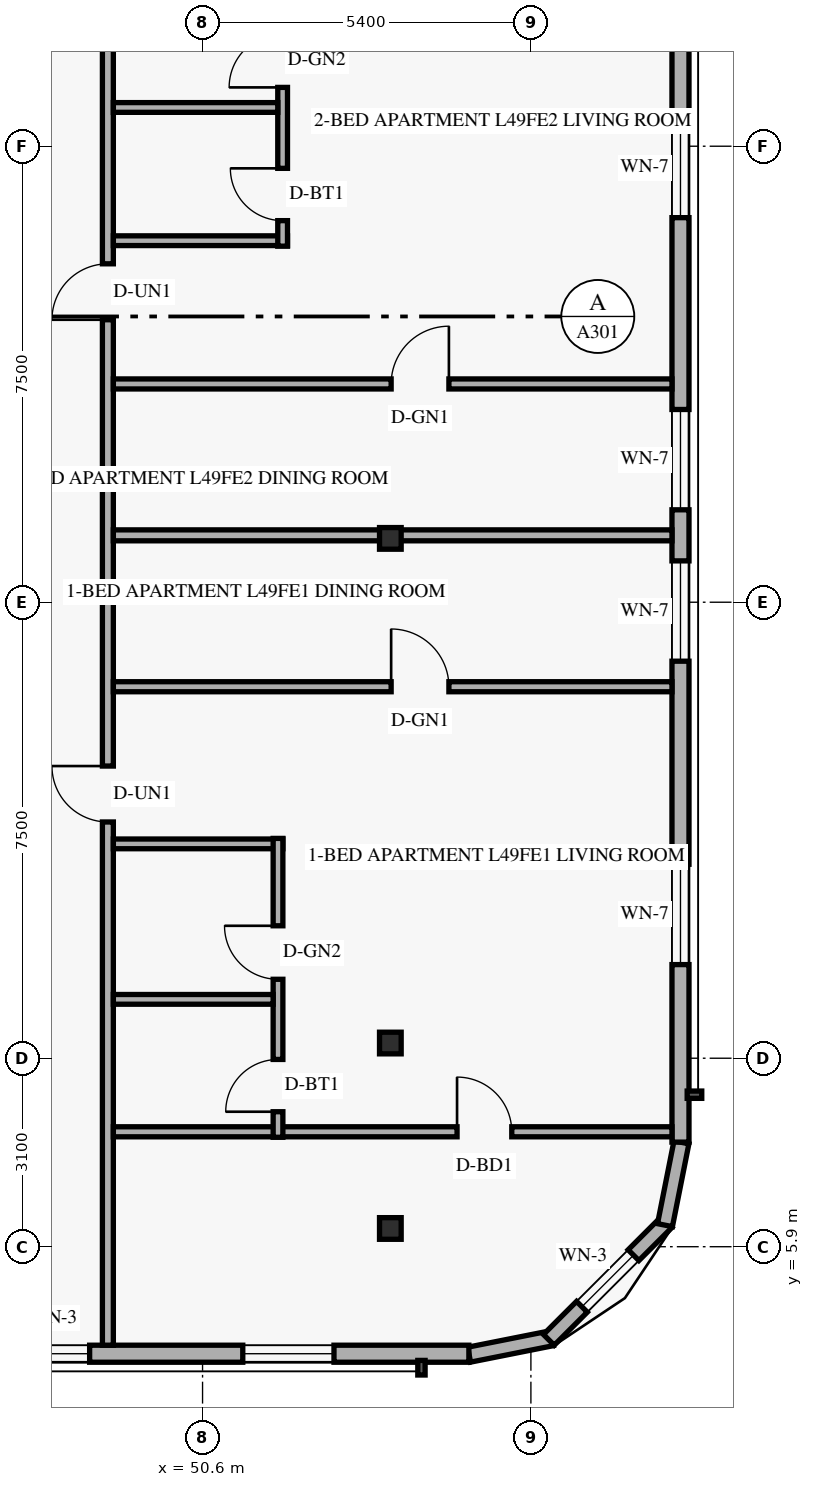
"""IFC4 building model, lengths in metres.
Left out: names, types, materials, properties, quantities, classifications, styles, units other than length and angle.
Written with IfcOpenShell. Run it as: python <this file> out.ifc"""

import sys

from ifc_helpers import new_model, si_unit, direction, frame, frame_2d, origin, origin_2d, place, context, subcontext, project, spatial, rectangle, hollow_rectangle, extrude, element, fill, save


model = new_model("IFC4")
c1 = context("Model", 3, precision=1e-05, world=origin(), true_north=direction((0.0, 1.0)))
c2 = subcontext(c1, "Body", "Model", "MODEL_VIEW")
j1 = project(units=[si_unit("LENGTHUNIT", "METRE"), si_unit("PLANEANGLEUNIT", "RADIAN")], contexts=[c1])
p1 = place(None, origin())
s1 = spatial("IfcSite", under=j1, at=p1, CompositionType="ELEMENT")
p2 = place(p1, origin())
s2 = spatial("IfcBuilding", under=s1, at=p2, CompositionType="ELEMENT")
p3 = place(p2, frame((0.0, 0.0, 188.4)))
s3 = spatial("IfcBuildingStorey", under=s2, at=p3, CompositionType="ELEMENT", Elevation=188.4)
for number, where, z_axis, x_axis in (
    (1, (53.584, 6.2, 0.0), (0.058, 0.0, 0.998), (0.0, 1.0, 0.0)),
    (2, (53.584, 9.25, 0.0), (0.058, 0.0, 0.998), (0.0, 1.0, 0.0)),
    (3, (53.584, 17.55, 0.0), (0.058, 0.0, 0.998), (0.0, 1.0, 0.0)),
):
    element("IfcColumn", number, at=place(p3, frame(where, z_axis=z_axis, x_axis=x_axis)), inside=s3, PredefinedType="COLUMN", context=c2, shape_type="SweptSolid", body=[
        extrude(hollow_rectangle(XDim=0.356, YDim=0.356, WallThickness=0.016, at=origin_2d()), origin(), (0.0, 0.0, 1.0), 3.606),
    ])
p4 = place(p3, frame((54.983, 4.124, 0.0), z_axis=(0.0, 0.0, 1.0), x_axis=(0.980809899341, 0.19496651342, 0.0)))
e4 = element("IfcWall", 4, at=p4, inside=s3, PredefinedType="SOLIDWALL", context=c2, shape_type="SweptSolid", body=[
    extrude(rectangle(XDim=1.389, YDim=0.25, at=frame_2d((0.694, 0.0))), origin(), (0.0, 0.0, 1.0), 3.35),
])
p5 = place(p3, frame((56.295, 4.368, 0.0), z_axis=(0.0, 0.0, 1.0), x_axis=(0.707106781187, 0.707106781187, 0.0)))
e5 = element("IfcWall", 5, at=p5, inside=s3, PredefinedType="SOLIDWALL", context=c2, shape_type="SweptSolid", body=[
    extrude(rectangle(XDim=2.739, YDim=0.25, at=frame_2d((1.37, 0.0))), origin(), (0.0, 0.0, 1.0), 3.35),
])
p6 = place(p5, frame((0.77, 0.0, 0.85)))
e6 = element("IfcOpeningElement", 6, at=p6, cuts=e5, PredefinedType="OPENING", context=c2, shape_type="SweptSolid", body=[
    extrude(rectangle(XDim=1.2, YDim=1.5, at=frame_2d((0.6, 0.75))), frame((0.0, 0.135, 0.0), z_axis=(0.0, -1.0, 0.0), x_axis=(1.0, 0.0, 0.0)), (0.0, 0.0, 1.0), 0.27),
])
p7 = place(p3, frame((58.205, 6.254, 0.0), z_axis=(0.0, 0.0, 1.0), x_axis=(0.19496651342, 0.980809899341, 0.0)))
e7 = element("IfcWall", 7, at=p7, inside=s3, PredefinedType="SOLIDWALL", context=c2, shape_type="SweptSolid", body=[
    extrude(rectangle(XDim=1.389, YDim=0.25, at=frame_2d((0.694, 0.0))), origin(), (0.0, 0.0, 1.0), 3.35),
])
p8 = place(p3, frame((34.4, 4.14, 0.0), z_axis=(0.0, 0.0, 1.0), x_axis=(1.0, 0.0, 0.0)))
e8 = element("IfcWall", 8, at=p8, inside=s3, PredefinedType="SOLIDWALL", context=c2, shape_type="SweptSolid", body=[
    extrude(rectangle(XDim=20.58, YDim=0.28, at=frame_2d((10.29, 0.0))), origin(), (0.0, 0.0, 1.0), 3.35),
])
p9 = place(p8, frame((1.535, 0.0, 0.85)))
e9 = element("IfcOpeningElement", 9, at=p9, cuts=e8, PredefinedType="OPENING", context=c2, shape_type="SweptSolid", body=[
    extrude(rectangle(XDim=1.5, YDim=1.55, at=frame_2d((0.75, 0.775))), frame((0.0, 0.15, 0.0), z_axis=(0.0, -1.0, 0.0), x_axis=(1.0, 0.0, 0.0)), (0.0, 0.0, 1.0), 0.3),
])
p10 = place(p8, frame((5.876, 0.0, 0.85)))
e10 = element("IfcOpeningElement", 10, at=p10, cuts=e8, PredefinedType="OPENING", context=c2, shape_type="SweptSolid", body=[
    extrude(rectangle(XDim=1.5, YDim=1.55, at=frame_2d((0.75, 0.775))), frame((0.0, 0.15, 0.0), z_axis=(0.0, -1.0, 0.0), x_axis=(1.0, 0.0, 0.0)), (0.0, 0.0, 1.0), 0.3),
])
p11 = place(p8, frame((10.523, 0.0, 0.85)))
e11 = element("IfcOpeningElement", 11, at=p11, cuts=e8, PredefinedType="OPENING", context=c2, shape_type="SweptSolid", body=[
    extrude(rectangle(XDim=1.5, YDim=1.55, at=frame_2d((0.75, 0.775))), frame((0.0, 0.15, 0.0), z_axis=(0.0, -1.0, 0.0), x_axis=(1.0, 0.0, 0.0)), (0.0, 0.0, 1.0), 0.3),
])
p12 = place(p8, frame((13.143, 0.0, 0.85)))
e12 = element("IfcOpeningElement", 12, at=p12, cuts=e8, PredefinedType="OPENING", context=c2, shape_type="SweptSolid", body=[
    extrude(rectangle(XDim=1.2, YDim=1.5, at=frame_2d((0.6, 0.75))), frame((0.0, 0.15, 0.0), z_axis=(0.0, -1.0, 0.0), x_axis=(1.0, 0.0, 0.0)), (0.0, 0.0, 1.0), 0.3),
])
p13 = place(p8, frame((16.862, 0.0, 0.85)))
e13 = element("IfcOpeningElement", 13, at=p13, cuts=e8, PredefinedType="OPENING", context=c2, shape_type="SweptSolid", body=[
    extrude(rectangle(XDim=1.5, YDim=1.55, at=frame_2d((0.75, 0.775))), frame((0.0, 0.15, 0.0), z_axis=(0.0, -1.0, 0.0), x_axis=(1.0, 0.0, 0.0)), (0.0, 0.0, 1.0), 0.3),
])
p14 = place(p3, frame((58.46, 7.62, 0.0), z_axis=(0.0, 0.0, 1.0), x_axis=(0.0, 1.0, 0.0)))
e14 = element("IfcWall", 14, at=p14, inside=s3, PredefinedType="SOLIDWALL", context=c2, shape_type="SweptSolid", body=[
    extrude(rectangle(XDim=32.76, YDim=0.28, at=frame_2d((16.38, 0.0))), origin(), (0.0, 0.0, 1.0), 3.35),
])
p15 = place(p14, frame((2.92, 0.0, 0.85)))
e15 = element("IfcOpeningElement", 15, at=p15, cuts=e14, PredefinedType="OPENING", context=c2, shape_type="SweptSolid", body=[
    extrude(rectangle(XDim=1.65, YDim=1.6, at=frame_2d((0.825, 0.8))), frame((0.0, 0.15, 0.0), z_axis=(0.0, -1.0, 0.0), x_axis=(1.0, 0.0, 0.0)), (0.0, 0.0, 1.0), 0.3),
])
p16 = place(p14, frame((7.91, 0.0, 0.85)))
e16 = element("IfcOpeningElement", 16, at=p16, cuts=e14, PredefinedType="OPENING", context=c2, shape_type="SweptSolid", body=[
    extrude(rectangle(XDim=1.65, YDim=1.6, at=frame_2d((0.825, 0.8))), frame((0.0, 0.15, 0.0), z_axis=(0.0, -1.0, 0.0), x_axis=(1.0, 0.0, 0.0)), (0.0, 0.0, 1.0), 0.3),
])
p17 = place(p14, frame((10.4, 0.0, 0.85)))
e17 = element("IfcOpeningElement", 17, at=p17, cuts=e14, PredefinedType="OPENING", context=c2, shape_type="SweptSolid", body=[
    extrude(rectangle(XDim=1.65, YDim=1.6, at=frame_2d((0.825, 0.8))), frame((0.0, 0.15, 0.0), z_axis=(0.0, -1.0, 0.0), x_axis=(1.0, 0.0, 0.0)), (0.0, 0.0, 1.0), 0.3),
])
p18 = place(p14, frame((15.205, 0.0, 0.85)))
e18 = element("IfcOpeningElement", 18, at=p18, cuts=e14, PredefinedType="OPENING", context=c2, shape_type="SweptSolid", body=[
    extrude(rectangle(XDim=1.65, YDim=1.6, at=frame_2d((0.825, 0.8))), frame((0.0, 0.15, 0.0), z_axis=(0.0, -1.0, 0.0), x_axis=(1.0, 0.0, 0.0)), (0.0, 0.0, 1.0), 0.3),
])
p19 = place(p14, frame((20.76, 0.0, 0.85)))
e19 = element("IfcOpeningElement", 19, at=p19, cuts=e14, PredefinedType="OPENING", context=c2, shape_type="SweptSolid", body=[
    extrude(rectangle(XDim=1.65, YDim=1.6, at=frame_2d((0.825, 0.8))), frame((0.0, 0.15, 0.0), z_axis=(0.0, -1.0, 0.0), x_axis=(1.0, 0.0, 0.0)), (0.0, 0.0, 1.0), 0.3),
])
p20 = place(p14, frame((24.0, 0.0, 0.85)))
e20 = element("IfcOpeningElement", 20, at=p20, cuts=e14, PredefinedType="OPENING", context=c2, shape_type="SweptSolid", body=[
    extrude(rectangle(XDim=1.65, YDim=1.6, at=frame_2d((0.825, 0.8))), frame((0.0, 0.15, 0.0), z_axis=(0.0, -1.0, 0.0), x_axis=(1.0, 0.0, 0.0)), (0.0, 0.0, 1.0), 0.3),
])
p21 = place(p14, frame((28.59, 0.0, 0.85)))
e21 = element("IfcOpeningElement", 21, at=p21, cuts=e14, PredefinedType="OPENING", context=c2, shape_type="SweptSolid", body=[
    extrude(rectangle(XDim=1.65, YDim=1.6, at=frame_2d((0.825, 0.8))), frame((0.0, 0.15, 0.0), z_axis=(0.0, -1.0, 0.0), x_axis=(1.0, 0.0, 0.0)), (0.0, 0.0, 1.0), 0.3),
])
p22 = place(p3, frame((49.043, 4.28, 0.0), z_axis=(0.0, 0.0, 1.0), x_axis=(0.0, 1.0, 0.0)))
e22 = element("IfcWall", 22, at=p22, inside=s3, PredefinedType="STANDARD", context=c2, shape_type="SweptSolid", body=[
    extrude(rectangle(XDim=39.44, YDim=0.18, at=frame_2d((19.72, 0.0))), origin(), (0.0, 0.0, 1.0), 2.72),
])
p23 = place(p22, frame((8.605, 0.0, 0.0)))
e23 = element("IfcOpeningElement", 23, at=p23, cuts=e22, PredefinedType="OPENING", context=c2, shape_type="SweptSolid", body=[
    extrude(rectangle(XDim=0.92, YDim=2.15, at=frame_2d((0.46, 1.075))), frame((0.0, 0.1, 0.0), z_axis=(0.0, -1.0, 0.0), x_axis=(1.0, 0.0, 0.0)), (0.0, 0.0, 1.0), 0.2),
])
p24 = place(p22, frame((16.866, 0.0, 0.0)))
e24 = element("IfcOpeningElement", 24, at=p24, cuts=e22, PredefinedType="OPENING", context=c2, shape_type="SweptSolid", body=[
    extrude(rectangle(XDim=0.92, YDim=2.15, at=frame_2d((0.46, 1.075))), frame((0.0, 0.1, 0.0), z_axis=(0.0, -1.0, 0.0), x_axis=(1.0, 0.0, 0.0)), (0.0, 0.0, 1.0), 0.2),
])
p25 = place(p22, frame((29.98, 0.0, 0.0)))
e25 = element("IfcOpeningElement", 25, at=p25, cuts=e22, PredefinedType="OPENING", context=c2, shape_type="SweptSolid", body=[
    extrude(rectangle(XDim=0.92, YDim=2.15, at=frame_2d((0.46, 1.075))), frame((0.0, 0.1, 0.0), z_axis=(0.0, -1.0, 0.0), x_axis=(1.0, 0.0, 0.0)), (0.0, 0.0, 1.0), 0.2),
])
p26 = place(p3, frame((49.133, 7.79, 0.0), z_axis=(0.0, 0.0, 1.0), x_axis=(1.0, 0.0, 0.0)))
e26 = element("IfcWall", 26, at=p26, inside=s3, PredefinedType="PARTITIONING", context=c2, shape_type="SweptSolid", body=[
    extrude(rectangle(XDim=9.187, YDim=0.165, at=frame_2d((4.594, 0.0))), origin(), (0.0, 0.0, 1.0), 2.869),
])
p27 = place(p26, frame((5.653, 0.0, 0.0)))
e27 = element("IfcOpeningElement", 27, at=p27, cuts=e26, PredefinedType="OPENING", context=c2, shape_type="SweptSolid", body=[
    extrude(rectangle(XDim=0.9, YDim=2.14, at=frame_2d((0.45, 1.07))), frame((0.0, 0.093, 0.0), z_axis=(0.0, -1.0, 0.0), x_axis=(1.0, 0.0, 0.0)), (0.0, 0.0, 1.0), 0.185),
])
p28 = place(p3, frame((49.133, 12.525, 0.0), z_axis=(0.0, 0.0, 1.0), x_axis=(1.0, 0.0, 0.0)))
e28 = element("IfcWall", 28, at=p28, inside=s3, PredefinedType="PLUMBINGWALL", context=c2, shape_type="SweptSolid", body=[
    extrude(rectangle(XDim=2.788, YDim=0.16, at=frame_2d((1.394, 0.0))), origin(), (0.0, 0.0, 1.0), 3.35),
])
p29 = place(p3, frame((51.841, 7.7, 0.0), z_axis=(0.0, 0.0, 1.0), x_axis=(0.0, 1.0, 0.0)))
e29 = element("IfcWall", 29, at=p29, inside=s3, PredefinedType="PLUMBINGWALL", context=c2, shape_type="SweptSolid", body=[
    extrude(rectangle(XDim=4.916, YDim=0.16, at=frame_2d((2.458, 0.0))), origin(), (0.0, 0.0, 1.0), 2.72),
])
p30 = place(p29, frame((0.42, 0.0, 0.0)))
e30 = element("IfcOpeningElement", 30, at=p30, cuts=e29, PredefinedType="OPENING", context=c2, shape_type="SweptSolid", body=[
    extrude(rectangle(XDim=0.86, YDim=2.12, at=frame_2d((0.43, 1.06))), frame((0.0, 0.09, 0.0), z_axis=(0.0, -1.0, 0.0), x_axis=(1.0, 0.0, 0.0)), (0.0, 0.0, 1.0), 0.18),
])
p31 = place(p29, frame((2.598, 0.0, 0.0)))
e31 = element("IfcOpeningElement", 31, at=p31, cuts=e29, PredefinedType="OPENING", context=c2, shape_type="SweptSolid", body=[
    extrude(rectangle(XDim=0.88, YDim=2.12, at=frame_2d((0.44, 1.06))), frame((0.0, 0.09, 0.0), z_axis=(0.0, -1.0, 0.0), x_axis=(1.0, 0.0, 0.0)), (0.0, 0.0, 1.0), 0.18),
])
p32 = place(p3, frame((49.133, 9.968, 0.0), z_axis=(0.0, 0.0, 1.0), x_axis=(1.0, 0.0, 0.0)))
e32 = element("IfcWall", 32, at=p32, inside=s3, PredefinedType="PLUMBINGWALL", context=c2, shape_type="SweptSolid", body=[
    extrude(rectangle(XDim=2.628, YDim=0.16, at=frame_2d((1.314, 0.0))), origin(), (0.0, 0.0, 1.0), 3.35),
])
p33 = place(p3, frame((49.133, 15.11, 0.0), z_axis=(0.0, 0.0, 1.0), x_axis=(1.0, 0.0, 0.0)))
e33 = element("IfcWall", 33, at=p33, inside=s3, PredefinedType="PARTITIONING", context=c2, shape_type="SweptSolid", body=[
    extrude(rectangle(XDim=9.187, YDim=0.165, at=frame_2d((4.594, 0.0))), origin(), (0.0, 0.0, 1.0), 2.869),
])
p34 = place(p33, frame((4.569, 0.0, 0.0)))
e34 = element("IfcOpeningElement", 34, at=p34, cuts=e33, PredefinedType="OPENING", context=c2, shape_type="SweptSolid", body=[
    extrude(rectangle(XDim=0.95, YDim=2.15, at=frame_2d((0.475, 1.075))), frame((0.0, 0.093, 0.0), z_axis=(0.0, -1.0, 0.0), x_axis=(1.0, 0.0, 0.0)), (0.0, 0.0, 1.0), 0.185),
])
p35 = place(p3, frame((49.133, 17.6, 0.0), z_axis=(0.0, 0.0, 1.0), x_axis=(1.0, 0.0, 0.0)))
e35 = element("IfcWall", 35, at=p35, inside=s3, PredefinedType="PARTITIONING", context=c2, shape_type="SweptSolid", body=[
    extrude(rectangle(XDim=9.187, YDim=0.18, at=frame_2d((4.594, 0.0))), origin(), (0.0, 0.0, 1.0), 2.72),
])
p36 = place(p3, frame((49.133, 22.446, 0.0), z_axis=(0.0, 0.0, 1.0), x_axis=(1.0, 0.0, 0.0)))
e36 = element("IfcWall", 36, at=p36, inside=s3, PredefinedType="PLUMBINGWALL", context=c2, shape_type="SweptSolid", body=[
    extrude(rectangle(XDim=2.864, YDim=0.16, at=frame_2d((1.432, 0.0))), origin(), (0.0, 0.0, 1.0), 3.35),
])
p37 = place(p3, frame((51.917, 22.356, 0.0), z_axis=(0.0, 0.0, 1.0), x_axis=(0.0, 1.0, 0.0)))
e37 = element("IfcWall", 37, at=p37, inside=s3, PredefinedType="PLUMBINGWALL", context=c2, shape_type="SweptSolid", body=[
    extrude(rectangle(XDim=4.944, YDim=0.16, at=frame_2d((2.472, 0.0))), origin(), (0.0, 0.0, 1.0), 3.35),
])
p38 = place(p37, frame((0.42, 0.0, 0.0)))
e38 = element("IfcOpeningElement", 38, at=p38, cuts=e37, PredefinedType="OPENING", context=c2, shape_type="SweptSolid", body=[
    extrude(rectangle(XDim=0.86, YDim=2.12, at=frame_2d((0.43, 1.06))), frame((0.0, 0.09, 0.0), z_axis=(0.0, -1.0, 0.0), x_axis=(1.0, 0.0, 0.0)), (0.0, 0.0, 1.0), 0.18),
])
p39 = place(p37, frame((2.611, 0.0, 0.0)))
e39 = element("IfcOpeningElement", 39, at=p39, cuts=e37, PredefinedType="OPENING", context=c2, shape_type="SweptSolid", body=[
    extrude(rectangle(XDim=0.88, YDim=2.12, at=frame_2d((0.44, 1.06))), frame((0.0, 0.09, 0.0), z_axis=(0.0, -1.0, 0.0), x_axis=(1.0, 0.0, 0.0)), (0.0, 0.0, 1.0), 0.18),
])
p40 = place(p3, frame((49.133, 24.637, 0.0), z_axis=(0.0, 0.0, 1.0), x_axis=(1.0, 0.0, 0.0)))
e40 = element("IfcWall", 40, at=p40, inside=s3, PredefinedType="PLUMBINGWALL", context=c2, shape_type="SweptSolid", body=[
    extrude(rectangle(XDim=2.704, YDim=0.16, at=frame_2d((1.352, 0.0))), origin(), (0.0, 0.0, 1.0), 3.35),
])
p41 = place(p3, frame((49.133, 20.09, 0.0), z_axis=(0.0, 0.0, 1.0), x_axis=(1.0, 0.0, 0.0)))
e41 = element("IfcWall", 41, at=p41, inside=s3, PredefinedType="PARTITIONING", context=c2, shape_type="SweptSolid", body=[
    extrude(rectangle(XDim=9.187, YDim=0.165, at=frame_2d((4.594, 0.0))), origin(), (0.0, 0.0, 1.0), 2.869),
])
p42 = place(p41, frame((4.569, 0.0, 0.0)))
e42 = element("IfcOpeningElement", 42, at=p42, cuts=e41, PredefinedType="OPENING", context=c2, shape_type="SweptSolid", body=[
    extrude(rectangle(XDim=0.95, YDim=2.15, at=frame_2d((0.475, 1.075))), frame((0.0, 0.093, 0.0), z_axis=(0.0, -1.0, 0.0), x_axis=(1.0, 0.0, 0.0)), (0.0, 0.0, 1.0), 0.185),
])
p43 = place(p6, origin())
e43 = element("IfcWindow", 43, at=p43, inside=s3, PartitioningType="SINGLE_PANEL", PredefinedType="WINDOW", context=c2, shape_type="SweptSolid", body=[
    extrude(rectangle(XDim=1.2, YDim=1.5, at=frame_2d((0.6, 0.75))), frame((0.0, 0.03, 0.0), z_axis=(0.0, -1.0, 0.0), x_axis=(1.0, 0.0, 0.0)), (0.0, 0.0, 1.0), 0.06),
])
fill(e6, e43)
p44 = place(p12, origin())
e44 = element("IfcWindow", 44, at=p44, inside=s3, PartitioningType="SINGLE_PANEL", PredefinedType="WINDOW", context=c2, shape_type="SweptSolid", body=[
    extrude(rectangle(XDim=1.2, YDim=1.5, at=frame_2d((0.6, 0.75))), frame((0.0, 0.03, 0.0), z_axis=(0.0, -1.0, 0.0), x_axis=(1.0, 0.0, 0.0)), (0.0, 0.0, 1.0), 0.06),
])
fill(e12, e44)
p45 = place(p13, origin())
e45 = element("IfcWindow", 45, at=p45, inside=s3, PartitioningType="SINGLE_PANEL", PredefinedType="WINDOW", context=c2, shape_type="SweptSolid", body=[
    extrude(rectangle(XDim=1.5, YDim=1.55, at=frame_2d((0.75, 0.775))), frame((0.0, 0.03, 0.0), z_axis=(0.0, -1.0, 0.0), x_axis=(1.0, 0.0, 0.0)), (0.0, 0.0, 1.0), 0.06),
])
fill(e13, e45)
p46 = place(p15, origin())
e46 = element("IfcWindow", 46, at=p46, inside=s3, PartitioningType="SINGLE_PANEL", PredefinedType="WINDOW", context=c2, shape_type="SweptSolid", body=[
    extrude(rectangle(XDim=1.65, YDim=1.6, at=frame_2d((0.825, 0.8))), frame((0.0, 0.03, 0.0), z_axis=(0.0, -1.0, 0.0), x_axis=(1.0, 0.0, 0.0)), (0.0, 0.0, 1.0), 0.06),
])
fill(e15, e46)
p47 = place(p16, origin())
e47 = element("IfcWindow", 47, at=p47, inside=s3, PartitioningType="SINGLE_PANEL", PredefinedType="WINDOW", context=c2, shape_type="SweptSolid", body=[
    extrude(rectangle(XDim=1.65, YDim=1.6, at=frame_2d((0.825, 0.8))), frame((0.0, 0.03, 0.0), z_axis=(0.0, -1.0, 0.0), x_axis=(1.0, 0.0, 0.0)), (0.0, 0.0, 1.0), 0.06),
])
fill(e16, e47)
p48 = place(p17, origin())
e48 = element("IfcWindow", 48, at=p48, inside=s3, PartitioningType="SINGLE_PANEL", PredefinedType="WINDOW", context=c2, shape_type="SweptSolid", body=[
    extrude(rectangle(XDim=1.65, YDim=1.6, at=frame_2d((0.825, 0.8))), frame((0.0, 0.03, 0.0), z_axis=(0.0, -1.0, 0.0), x_axis=(1.0, 0.0, 0.0)), (0.0, 0.0, 1.0), 0.06),
])
fill(e17, e48)
p49 = place(p18, origin())
e49 = element("IfcWindow", 49, at=p49, inside=s3, PartitioningType="SINGLE_PANEL", PredefinedType="WINDOW", context=c2, shape_type="SweptSolid", body=[
    extrude(rectangle(XDim=1.65, YDim=1.6, at=frame_2d((0.825, 0.8))), frame((0.0, 0.03, 0.0), z_axis=(0.0, -1.0, 0.0), x_axis=(1.0, 0.0, 0.0)), (0.0, 0.0, 1.0), 0.06),
])
fill(e18, e49)
p50 = place(p34, origin())
e50 = element("IfcDoor", 50, at=p50, inside=s3, OperationType="SINGLE_SWING_LEFT", PredefinedType="DOOR", context=c2, shape_type="SweptSolid", body=[
    extrude(rectangle(XDim=0.95, YDim=2.15, at=frame_2d((0.475, 1.075))), frame((0.0, 0.025, 0.0), z_axis=(0.0, -1.0, 0.0), x_axis=(1.0, 0.0, 0.0)), (0.0, 0.0, 1.0), 0.05),
])
fill(e34, e50)
p51 = place(p23, origin())
e51 = element("IfcDoor", 51, at=p51, inside=s3, OperationType="SINGLE_SWING_RIGHT", PredefinedType="DOOR", context=c2, shape_type="SweptSolid", body=[
    extrude(rectangle(XDim=0.92, YDim=2.15, at=frame_2d((0.46, 1.075))), frame((0.0, 0.025, 0.0), z_axis=(0.0, -1.0, 0.0), x_axis=(1.0, 0.0, 0.0)), (0.0, 0.0, 1.0), 0.05),
])
fill(e23, e51)
p52 = place(p30, origin())
e52 = element("IfcDoor", 52, at=p52, inside=s3, OperationType="SINGLE_SWING_LEFT", PredefinedType="DOOR", context=c2, shape_type="SweptSolid", body=[
    extrude(rectangle(XDim=0.86, YDim=2.12, at=frame_2d((0.43, 1.06))), frame((0.0, 0.025, 0.0), z_axis=(0.0, -1.0, 0.0), x_axis=(1.0, 0.0, 0.0)), (0.0, 0.0, 1.0), 0.05),
])
fill(e30, e52)
p53 = place(p31, origin())
e53 = element("IfcDoor", 53, at=p53, inside=s3, OperationType="SINGLE_SWING_RIGHT", PredefinedType="DOOR", context=c2, shape_type="SweptSolid", body=[
    extrude(rectangle(XDim=0.88, YDim=2.12, at=frame_2d((0.44, 1.06))), frame((0.0, 0.025, 0.0), z_axis=(0.0, -1.0, 0.0), x_axis=(1.0, 0.0, 0.0)), (0.0, 0.0, 1.0), 0.05),
])
fill(e31, e53)
p54 = place(p27, origin())
e54 = element("IfcDoor", 54, at=p54, inside=s3, OperationType="SINGLE_SWING_LEFT", PredefinedType="DOOR", context=c2, shape_type="SweptSolid", body=[
    extrude(rectangle(XDim=0.9, YDim=2.14, at=frame_2d((0.45, 1.07))), frame((0.0, 0.025, 0.0), z_axis=(0.0, -1.0, 0.0), x_axis=(1.0, 0.0, 0.0)), (0.0, 0.0, 1.0), 0.05),
])
fill(e27, e54)
p55 = place(p42, origin())
e55 = element("IfcDoor", 55, at=p55, inside=s3, OperationType="SINGLE_SWING_RIGHT", PredefinedType="DOOR", context=c2, shape_type="SweptSolid", body=[
    extrude(rectangle(XDim=0.95, YDim=2.15, at=frame_2d((0.475, 1.075))), frame((0.0, 0.025, 0.0), z_axis=(0.0, -1.0, 0.0), x_axis=(1.0, 0.0, 0.0)), (0.0, 0.0, 1.0), 0.05),
])
fill(e42, e55)
p56 = place(p24, origin())
e56 = element("IfcDoor", 56, at=p56, inside=s3, OperationType="SINGLE_SWING_LEFT", PredefinedType="DOOR", context=c2, shape_type="SweptSolid", body=[
    extrude(rectangle(XDim=0.92, YDim=2.15, at=frame_2d((0.46, 1.075))), frame((0.0, 0.025, 0.0), z_axis=(0.0, -1.0, 0.0), x_axis=(1.0, 0.0, 0.0)), (0.0, 0.0, 1.0), 0.05),
])
fill(e24, e56)
p57 = place(p38, origin())
e57 = element("IfcDoor", 57, at=p57, inside=s3, OperationType="SINGLE_SWING_RIGHT", PredefinedType="DOOR", context=c2, shape_type="SweptSolid", body=[
    extrude(rectangle(XDim=0.86, YDim=2.12, at=frame_2d((0.43, 1.06))), frame((0.0, 0.025, 0.0), z_axis=(0.0, -1.0, 0.0), x_axis=(1.0, 0.0, 0.0)), (0.0, 0.0, 1.0), 0.05),
])
fill(e38, e57)
p58 = place(p39, origin())
e58 = element("IfcDoor", 58, at=p58, inside=s3, OperationType="SINGLE_SWING_LEFT", PredefinedType="DOOR", context=c2, shape_type="SweptSolid", body=[
    extrude(rectangle(XDim=0.88, YDim=2.12, at=frame_2d((0.44, 1.06))), frame((0.0, 0.025, 0.0), z_axis=(0.0, -1.0, 0.0), x_axis=(1.0, 0.0, 0.0)), (0.0, 0.0, 1.0), 0.05),
])
fill(e39, e58)
save(model, sys.argv[1])
